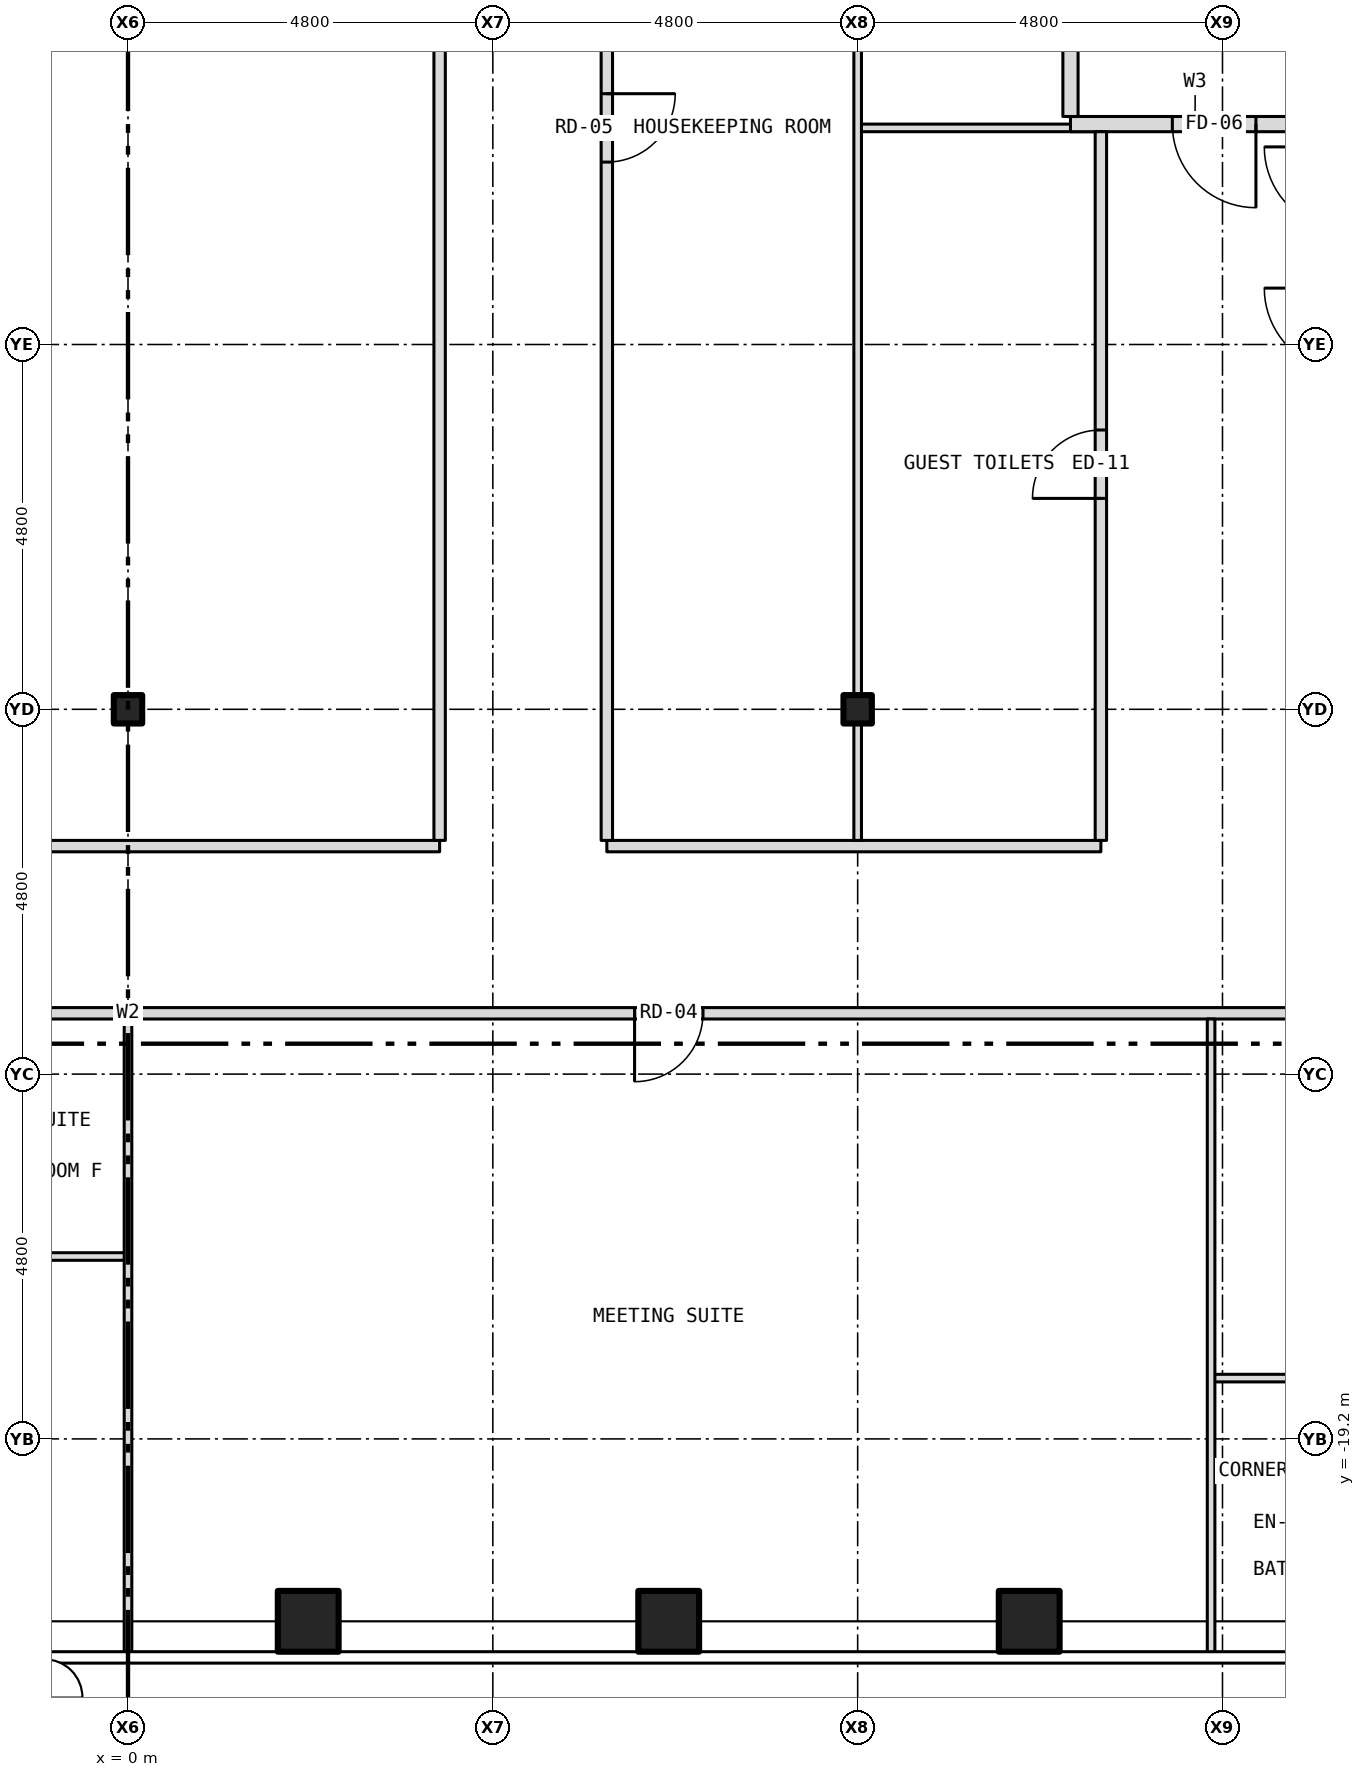
"""IFC4 building model, lengths in metres.
Left out: names, types, materials, properties, quantities, classifications, styles, units other than length and angle.
Written with IfcOpenShell. Run it as: python <this file> out.ifc"""

import sys

from ifc_helpers import new_model, si_unit, direction, frame, frame_2d, origin, origin_2d, place, context, subcontext, project, spatial, rectangle, hollow_rectangle, i_section, extrude, element, fill, save


model = new_model("IFC4")
c1 = context("Model", 3, precision=1e-05, world=origin(), true_north=direction((0.0, 1.0)))
c2 = subcontext(c1, "Body", "Model", "MODEL_VIEW")
j1 = project(units=[si_unit("LENGTHUNIT", "METRE"), si_unit("PLANEANGLEUNIT", "RADIAN")], contexts=[c1])
p1 = place(None, origin())
s1 = spatial("IfcSite", under=j1, at=p1, CompositionType="ELEMENT")
p2 = place(p1, origin())
s2 = spatial("IfcBuilding", under=s1, at=p2, CompositionType="ELEMENT")
p3 = place(p2, frame((0.0, 0.0, 179.5)))
s3 = spatial("IfcBuildingStorey", under=s2, at=p3, CompositionType="ELEMENT", Elevation=179.5)
for number, where, z_axis, x_axis in (
    (1, (2.371, -21.6, -0.15), (0.0, 0.0, 1.0), (1.0, 0.0, 0.0)),
    (2, (7.114, -21.6, -0.15), (0.0, 0.0, 1.0), (1.0, 0.0, 0.0)),
    (3, (11.857, -21.6, -0.15), (0.0, 0.0, 1.0), (1.0, 0.0, 0.0)),
):
    element("IfcColumn", number, at=place(p3, frame(where, z_axis=z_axis, x_axis=x_axis)), inside=s3, PredefinedType="COLUMN", context=c2, shape_type="SweptSolid", body=[
        extrude(hollow_rectangle(XDim=0.8, YDim=0.8, WallThickness=0.045, at=origin_2d()), origin(), (0.0, 0.0, 1.0), 3.5),
    ])
for number, where, z_axis, x_axis in (
    (4, (0.0, -9.6, -0.15), (0.0, 0.0, 1.0), (1.0, 0.0, 0.0)),
    (5, (9.6, -9.6, -0.15), (0.0, 0.0, 1.0), (1.0, 0.0, 0.0)),
):
    element("IfcColumn", number, at=place(p3, frame(where, z_axis=z_axis, x_axis=x_axis)), inside=s3, PredefinedType="COLUMN", context=c2, shape_type="SweptSolid", body=[
        extrude(i_section(OverallWidth=0.373, OverallDepth=0.373, WebThickness=0.016, FlangeThickness=0.026, at=origin_2d()), origin(), (0.0, 0.0, 1.0), 3.5),
    ])
p4 = place(p3, frame((14.25, -18.4, 0.0), z_axis=(0.0, 0.0, 1.0), x_axis=(1.0, 0.0, 0.0)))
e6 = element("IfcWall", 6, at=p4, inside=s3, PredefinedType="PARTITIONING", context=c2, shape_type="SweptSolid", body=[
    extrude(rectangle(XDim=2.78, YDim=0.1, at=frame_2d((1.39, 0.0))), origin(), (0.0, 0.0, 1.0), 3.35),
])
p5 = place(p4, frame((1.189, 0.0, 0.0)))
e7 = element("IfcOpeningElement", 7, at=p5, cuts=e6, PredefinedType="OPENING", context=c2, shape_type="SweptSolid", body=[
    extrude(rectangle(XDim=0.9, YDim=2.1, at=frame_2d((0.45, 1.05))), frame((0.0, 0.062, 0.0), z_axis=(0.0, -1.0, 0.0), x_axis=(1.0, 0.0, 0.0)), (0.0, 0.0, 1.0), 0.124),
])
p6 = place(p3, frame((-2.2, -16.8, 0.0), z_axis=(0.0, 0.0, 1.0), x_axis=(1.0, 0.0, 0.0)))
e8 = element("IfcWall", 8, at=p6, inside=s3, PredefinedType="PARTITIONING", context=c2, shape_type="SweptSolid", body=[
    extrude(rectangle(XDim=2.2, YDim=0.1, at=frame_2d((1.1, 0.0))), origin(), (0.0, 0.0, 1.0), 3.35),
])
p7 = place(p3, frame((-15.8, -13.6, 0.0), z_axis=(0.0, 0.0, 1.0), x_axis=(1.0, 0.0, 0.0)))
e9 = element("IfcWall", 9, at=p7, inside=s3, PredefinedType="PARTITIONING", context=c2, shape_type="SweptSolid", body=[
    extrude(rectangle(XDim=31.6, YDim=0.15, at=frame_2d((15.8, 0.0))), origin(), (0.0, 0.0, 1.0), 3.35),
])
p8 = place(p7, frame((3.529, 0.0, 0.0)))
e10 = element("IfcOpeningElement", 10, at=p8, cuts=e9, PredefinedType="OPENING", context=c2, shape_type="SweptSolid", body=[
    extrude(rectangle(XDim=1.0, YDim=2.1, at=frame_2d((0.5, 1.05))), frame((0.0, 0.087, 0.0), z_axis=(0.0, -1.0, 0.0), x_axis=(1.0, 0.0, 0.0)), (0.0, 0.0, 1.0), 0.174),
])
p9 = place(p7, frame((10.643, 0.0, 0.0)))
e11 = element("IfcOpeningElement", 11, at=p9, cuts=e9, PredefinedType="OPENING", context=c2, shape_type="SweptSolid", body=[
    extrude(rectangle(XDim=1.0, YDim=2.1, at=frame_2d((0.5, 1.05))), frame((0.0, 0.087, 0.0), z_axis=(0.0, -1.0, 0.0), x_axis=(1.0, 0.0, 0.0)), (0.0, 0.0, 1.0), 0.174),
])
p10 = place(p7, frame((22.465, 0.0, 0.0)))
e12 = element("IfcOpeningElement", 12, at=p10, cuts=e9, PredefinedType="OPENING", context=c2, shape_type="SweptSolid", body=[
    extrude(rectangle(XDim=0.9, YDim=2.1, at=frame_2d((0.45, 1.05))), frame((0.0, 0.087, 0.0), z_axis=(0.0, -1.0, 0.0), x_axis=(1.0, 0.0, 0.0)), (0.0, 0.0, 1.0), 0.174),
])
p11 = place(p3, frame((-12.8, -11.4, 0.0), z_axis=(0.0, 0.0, 1.0), x_axis=(1.0, 0.0, 0.0)))
e13 = element("IfcWall", 13, at=p11, inside=s3, PredefinedType="PARTITIONING", context=c2, shape_type="SweptSolid", body=[
    extrude(rectangle(XDim=16.9, YDim=0.15, at=frame_2d((8.45, 0.0))), origin(), (0.0, 0.0, 1.0), 3.35),
])
p12 = place(p11, frame((8.0, 0.0, 0.0)))
e14 = element("IfcOpeningElement", 14, at=p12, cuts=e13, PredefinedType="OPENING", context=c2, shape_type="SweptSolid", body=[
    extrude(rectangle(XDim=0.9, YDim=2.1, at=frame_2d((0.45, 1.05))), frame((0.0, 0.087, 0.0), z_axis=(0.0, -1.0, 0.0), x_axis=(1.0, 0.0, 0.0)), (0.0, 0.0, 1.0), 0.174),
])
p13 = place(p3, frame((6.3, -11.4, 0.0), z_axis=(0.0, 0.0, 1.0), x_axis=(1.0, 0.0, 0.0)))
e15 = element("IfcWall", 15, at=p13, inside=s3, PredefinedType="PARTITIONING", context=c2, shape_type="SweptSolid", body=[
    extrude(rectangle(XDim=6.5, YDim=0.15, at=frame_2d((3.25, 0.0))), origin(), (0.0, 0.0, 1.0), 3.35),
])
p14 = place(p3, frame((9.6, -1.95, 0.0), z_axis=(0.0, 0.0, 1.0), x_axis=(1.0, 0.0, 0.0)))
e16 = element("IfcWall", 16, at=p14, inside=s3, PredefinedType="PARTITIONING", context=c2, shape_type="SweptSolid", body=[
    extrude(rectangle(XDim=3.2, YDim=0.1, at=frame_2d((1.6, 0.0))), origin(), (0.0, 0.0, 1.0), 3.35),
])
p15 = place(p3, frame((12.4, -1.9, 0.0), z_axis=(0.0, 0.0, 1.0), x_axis=(1.0, 0.0, 0.0)))
e17 = element("IfcWall", 17, at=p15, inside=s3, PredefinedType="PARTITIONING", context=c2, shape_type="SweptSolid", body=[
    extrude(rectangle(XDim=3.28, YDim=0.2, at=frame_2d((1.64, 0.0))), origin(), (0.0, 0.0, 1.0), 3.35),
])
p16 = place(p15, frame((1.34, 0.0, 0.0)))
e18 = element("IfcOpeningElement", 18, at=p16, cuts=e17, PredefinedType="OPENING", context=c2, shape_type="SweptSolid", body=[
    extrude(rectangle(XDim=1.1, YDim=2.1, at=frame_2d((0.55, 1.05))), frame((0.0, 0.112, 0.0), z_axis=(0.0, -1.0, 0.0), x_axis=(1.0, 0.0, 0.0)), (0.0, 0.0, 1.0), 0.224),
])
p17 = place(p3, frame((0.0, -22.03, 0.0), z_axis=(0.0, 0.0, 1.0), x_axis=(0.0, 1.0, 0.0)))
e19 = element("IfcWall", 19, at=p17, inside=s3, PredefinedType="PARTITIONING", context=c2, shape_type="SweptSolid", body=[
    extrude(rectangle(XDim=8.355, YDim=0.1, at=frame_2d((4.177, 0.0))), origin(), (0.0, 0.0, 1.0), 2.728),
])
p18 = place(p3, frame((4.1, -11.325, 0.0), z_axis=(0.0, 0.0, 1.0), x_axis=(0.0, 1.0, 0.0)))
e20 = element("IfcWall", 20, at=p18, inside=s3, PredefinedType="PARTITIONING", context=c2, shape_type="SweptSolid", body=[
    extrude(rectangle(XDim=18.75, YDim=0.15, at=frame_2d((9.375, 0.0))), origin(), (0.0, 0.0, 1.0), 3.35),
])
p19 = place(p3, frame((6.3, -11.325, 0.0), z_axis=(0.0, 0.0, 1.0), x_axis=(0.0, 1.0, 0.0)))
e21 = element("IfcWall", 21, at=p19, inside=s3, PredefinedType="PARTITIONING", context=c2, shape_type="SweptSolid", body=[
    extrude(rectangle(XDim=18.75, YDim=0.15, at=frame_2d((9.375, 0.0))), origin(), (0.0, 0.0, 1.0), 3.35),
])
p20 = place(p19, frame((8.925, 0.0, 0.0)))
e22 = element("IfcOpeningElement", 22, at=p20, cuts=e21, PredefinedType="OPENING", context=c2, shape_type="SweptSolid", body=[
    extrude(rectangle(XDim=0.9, YDim=2.1, at=frame_2d((0.45, 1.05))), frame((0.0, 0.087, 0.0), z_axis=(0.0, -1.0, 0.0), x_axis=(1.0, 0.0, 0.0)), (0.0, 0.0, 1.0), 0.174),
])
p21 = place(p3, frame((9.6, -11.325, 0.0), z_axis=(0.0, 0.0, 1.0), x_axis=(0.0, 1.0, 0.0)))
e23 = element("IfcWall", 23, at=p21, inside=s3, PredefinedType="PARTITIONING", context=c2, shape_type="SweptSolid", body=[
    extrude(rectangle(XDim=1.538, YDim=0.1, at=frame_2d((0.769, 0.0))), origin(), (0.0, 0.0, 1.0), 2.728),
])
p22 = place(p3, frame((9.6, -9.787, 0.0), z_axis=(0.0, 0.0, 1.0), x_axis=(0.0, 1.0, 0.0)))
e24 = element("IfcWall", 24, at=p22, inside=s3, PredefinedType="PARTITIONING", context=c2, shape_type="SweptSolid", body=[
    extrude(rectangle(XDim=0.374, YDim=0.1, at=frame_2d((0.187, 0.0))), origin(), (0.0, 0.0, 1.0), 3.35),
])
p23 = place(p3, frame((9.6, -9.413, 0.0), z_axis=(0.0, 0.0, 1.0), x_axis=(0.0, 1.0, 0.0)))
e25 = element("IfcWall", 25, at=p23, inside=s3, PredefinedType="PARTITIONING", context=c2, shape_type="SweptSolid", body=[
    extrude(rectangle(XDim=9.226, YDim=0.1, at=frame_2d((4.613, 0.0))), origin(), (0.0, 0.0, 1.0), 2.728),
])
p24 = place(p3, frame((12.4, -1.8, 0.0), z_axis=(0.0, 0.0, 1.0), x_axis=(0.0, 1.0, 0.0)))
e26 = element("IfcWall", 26, at=p24, inside=s3, PredefinedType="PARTITIONING", context=c2, shape_type="SweptSolid", body=[
    extrude(rectangle(XDim=4.0, YDim=0.2, at=frame_2d((2.0, 0.0))), origin(), (0.0, 0.0, 1.0), 3.35),
])
p25 = place(p3, frame((12.8, -11.325, 0.0), z_axis=(0.0, 0.0, 1.0), x_axis=(0.0, 1.0, 0.0)))
e27 = element("IfcWall", 27, at=p25, inside=s3, PredefinedType="PARTITIONING", context=c2, shape_type="SweptSolid", body=[
    extrude(rectangle(XDim=9.325, YDim=0.15, at=frame_2d((4.663, 0.0))), origin(), (0.0, 0.0, 1.0), 3.35),
])
p26 = place(p25, frame((4.5, 0.0, 0.0)))
e28 = element("IfcOpeningElement", 28, at=p26, cuts=e27, PredefinedType="OPENING", context=c2, shape_type="SweptSolid", body=[
    extrude(rectangle(XDim=0.9, YDim=2.1, at=frame_2d((0.45, 1.05))), frame((0.0, 0.087, 0.0), z_axis=(0.0, -1.0, 0.0), x_axis=(1.0, 0.0, 0.0)), (0.0, 0.0, 1.0), 0.174),
])
p27 = place(p3, frame((14.25, -22.03, 0.0), z_axis=(0.0, 0.0, 1.0), x_axis=(0.0, 1.0, 0.0)))
e29 = element("IfcWall", 29, at=p27, inside=s3, PredefinedType="PARTITIONING", context=c2, shape_type="SweptSolid", body=[
    extrude(rectangle(XDim=8.355, YDim=0.1, at=frame_2d((4.177, 0.0))), origin(), (0.0, 0.0, 1.0), 2.817),
])
p28 = place(p16, origin())
e30 = element("IfcDoor", 30, at=p28, inside=s3, OperationType="SINGLE_SWING_RIGHT", PredefinedType="DOOR", context=c2, shape_type="SweptSolid", body=[
    extrude(rectangle(XDim=1.1, YDim=2.1, at=frame_2d((0.55, 1.05))), frame((0.0, 0.025, 0.0), z_axis=(0.0, -1.0, 0.0), x_axis=(1.0, 0.0, 0.0)), (0.0, 0.0, 1.0), 0.05),
])
fill(e18, e30)
p29 = place(p10, origin())
e31 = element("IfcDoor", 31, at=p29, inside=s3, OperationType="SINGLE_SWING_LEFT", PredefinedType="DOOR", context=c2, shape_type="SweptSolid", body=[
    extrude(rectangle(XDim=0.9, YDim=2.1, at=frame_2d((0.45, 1.05))), frame((0.0, 0.025, 0.0), z_axis=(0.0, -1.0, 0.0), x_axis=(1.0, 0.0, 0.0)), (0.0, 0.0, 1.0), 0.05),
])
fill(e12, e31)
p30 = place(p26, origin())
e32 = element("IfcDoor", 32, at=p30, inside=s3, OperationType="SINGLE_SWING_LEFT", PredefinedType="DOOR", context=c2, shape_type="SweptSolid", body=[
    extrude(rectangle(XDim=0.9, YDim=2.1, at=frame_2d((0.45, 1.05))), frame((0.0, 0.025, 0.0), z_axis=(0.0, -1.0, 0.0), x_axis=(1.0, 0.0, 0.0)), (0.0, 0.0, 1.0), 0.05),
])
fill(e28, e32)
p31 = place(p20, origin())
e33 = element("IfcDoor", 33, at=p31, inside=s3, OperationType="SINGLE_SWING_RIGHT", PredefinedType="DOOR", context=c2, shape_type="SweptSolid", body=[
    extrude(rectangle(XDim=0.9, YDim=2.1, at=frame_2d((0.45, 1.05))), frame((0.0, 0.025, 0.0), z_axis=(0.0, -1.0, 0.0), x_axis=(1.0, 0.0, 0.0)), (0.0, 0.0, 1.0), 0.05),
])
fill(e22, e33)
save(model, sys.argv[1])
